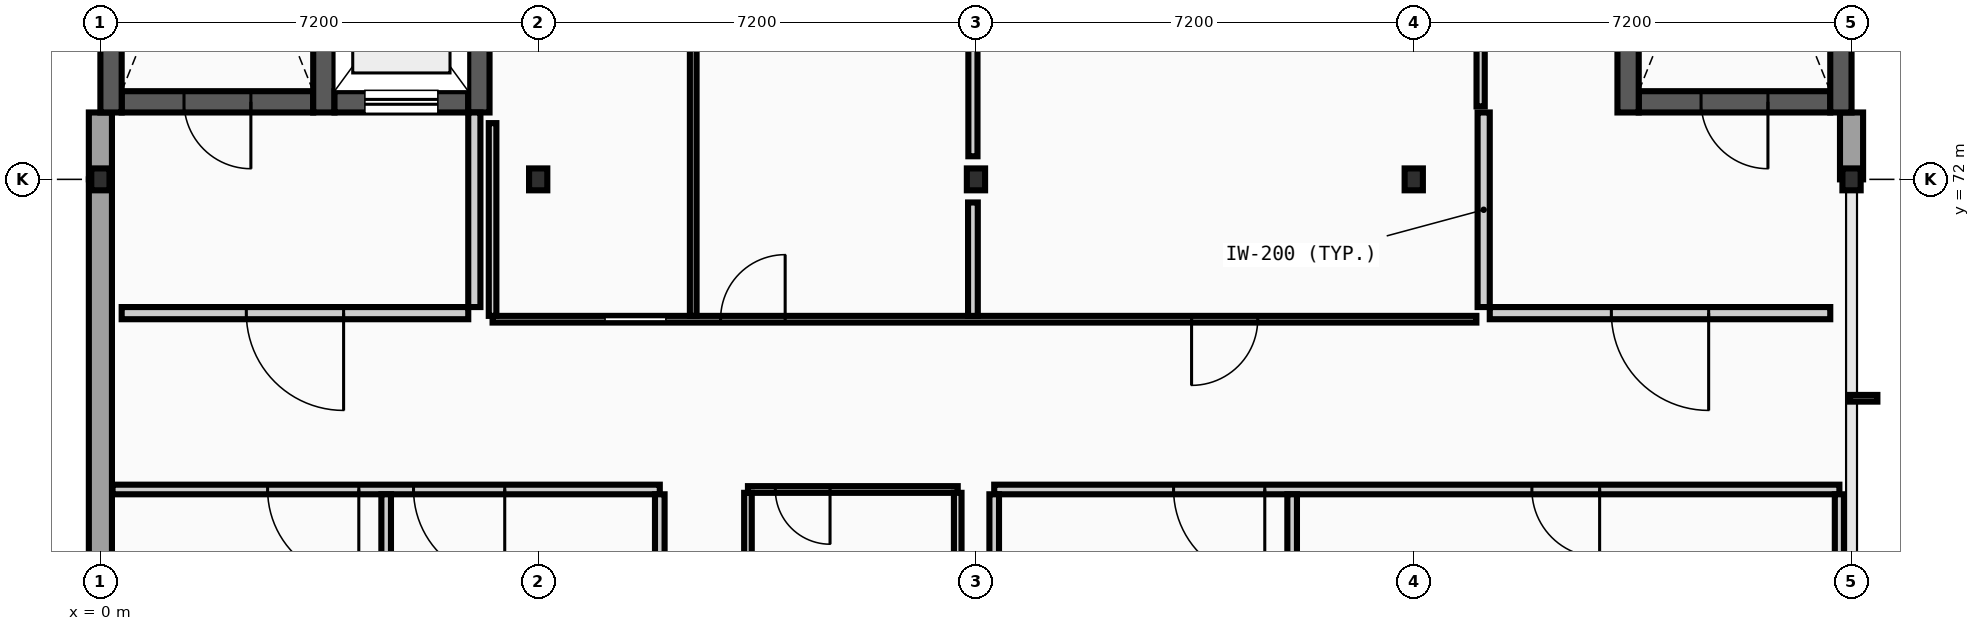
"""IFC4 building model, lengths in metres.
Left out: names, types, materials, properties, quantities, classifications, styles, units other than length and angle.
Written with IfcOpenShell. Run it as: python <this file> out.ifc"""

import sys

from ifc_helpers import new_model, si_unit, direction, frame, frame_2d, origin, origin_2d, place, context, subcontext, project, spatial, rectangle, i_section, extrude, element, fill, save


model = new_model("IFC4")
c1 = context("Model", 3, precision=1e-05, world=origin(), true_north=direction((0.0, 1.0)))
c2 = subcontext(c1, "Body", "Model", "MODEL_VIEW")
j1 = project(units=[si_unit("LENGTHUNIT", "METRE"), si_unit("PLANEANGLEUNIT", "RADIAN")], contexts=[c1])
p1 = place(None, origin())
s1 = spatial("IfcSite", under=j1, at=p1, CompositionType="ELEMENT")
p2 = place(p1, origin())
s2 = spatial("IfcBuilding", under=s1, at=p2, CompositionType="ELEMENT")
p3 = place(p2, frame((0.0, 0.0, 5.2)))
s3 = spatial("IfcBuildingStorey", under=s2, at=p3, CompositionType="ELEMENT", Elevation=5.2)
for number, where, z_axis, x_axis in (
    (1, (0.0, 72.0, 0.0), (0.0, 0.0, 1.0), (1.0, 0.0, 0.0)),
    (2, (7.2, 72.0, 0.0), (0.0, 0.0, 1.0), (1.0, 0.0, 0.0)),
    (3, (14.4, 72.0, 0.0), (0.0, 0.0, 1.0), (1.0, 0.0, 0.0)),
    (4, (21.6, 72.0, 0.0), (0.0, 0.0, 1.0), (1.0, 0.0, 0.0)),
    (5, (28.8, 72.0, 0.0), (0.0, 0.0, 1.0), (1.0, 0.0, 0.0)),
):
    element("IfcColumn", number, at=place(p3, frame(where, z_axis=z_axis, x_axis=x_axis)), inside=s3, PredefinedType="COLUMN", context=c2, shape_type="SweptSolid", body=[
        extrude(i_section(OverallWidth=0.3, OverallDepth=0.36, WebThickness=0.012, FlangeThickness=0.022, FilletRadius=0.027, at=origin_2d()), origin(), (0.0, 0.0, 1.0), 4.4),
    ])
p4 = place(p3, frame((0.0, 72.0, 0.0), z_axis=(0.0, 0.0, 1.0), x_axis=(0.0, -1.0, 0.0)))
e6 = element("IfcWall", 6, at=p4, inside=s3, PredefinedType="STANDARD", context=c2, shape_type="SweptSolid", body=[
    extrude(rectangle(XDim=7.2, YDim=0.38, at=frame_2d((3.6, 0.0))), origin(), (0.0, 0.0, 1.0), 3.81),
])
for number, where, z_axis, x_axis in (
    (7, (0.0, 73.1, 0.0), (0.0, 0.0, 1.0), (0.0, -1.0, 0.0)),
    (8, (28.8, 72.0, 0.0), (0.0, 0.0, 1.0), (0.0, 1.0, 0.0)),
):
    element("IfcWall", number, at=place(p3, frame(where, z_axis=z_axis, x_axis=x_axis)), inside=s3, PredefinedType="STANDARD", context=c2, shape_type="SweptSolid", body=[
        extrude(rectangle(XDim=1.1, YDim=0.38, at=frame_2d((0.55, 0.0))), origin(), (0.0, 0.0, 1.0), 4.185),
    ])
p5 = place(p3, frame((0.35, 73.275, 0.0), z_axis=(0.0, 0.0, 1.0), x_axis=(1.0, 0.0, 0.0)))
e9 = element("IfcWall", 9, at=p5, inside=s3, PredefinedType="SHEAR", context=c2, shape_type="SweptSolid", body=[
    extrude(rectangle(XDim=3.15, YDim=0.35, at=frame_2d((1.575, 0.0))), origin(), (0.0, 0.0, 1.0), 4.185),
])
p6 = place(p5, frame((1.025, 0.0, 0.0)))
e10 = element("IfcOpeningElement", 10, at=p6, cuts=e9, PredefinedType="OPENING", context=c2, shape_type="SweptSolid", body=[
    extrude(rectangle(XDim=1.1, YDim=2.15, at=frame_2d((0.55, 1.075))), frame((0.0, 0.185, 0.0), z_axis=(0.0, -1.0, 0.0), x_axis=(1.0, 0.0, 0.0)), (0.0, 0.0, 1.0), 0.37),
])
for number, where, z_axis, x_axis in (
    (11, (0.175, 73.1, 0.0), (0.0, 0.0, 1.0), (0.0, 1.0, 0.0)),
    (12, (3.675, 73.1, 0.0), (0.0, 0.0, 1.0), (0.0, 1.0, 0.0)),
):
    element("IfcWall", number, at=place(p3, frame(where, z_axis=z_axis, x_axis=x_axis)), inside=s3, PredefinedType="SHEAR", context=c2, shape_type="SweptSolid", body=[
        extrude(rectangle(XDim=8.71, YDim=0.35, at=frame_2d((4.355, 0.0))), origin(), (0.0, 0.0, 1.0), 4.185),
    ])
p7 = place(p3, frame((3.85, 73.275, 0.0), z_axis=(0.0, 0.0, 1.0), x_axis=(1.0, 0.0, 0.0)))
e13 = element("IfcWall", 13, at=p7, inside=s3, PredefinedType="SHEAR", context=c2, shape_type="SweptSolid", body=[
    extrude(rectangle(XDim=2.2, YDim=0.35, at=frame_2d((1.1, 0.0))), origin(), (0.0, 0.0, 1.0), 4.185),
])
p8 = place(p7, frame((0.5, 0.0, 0.0)))
e14 = element("IfcOpeningElement", 14, at=p8, cuts=e13, PredefinedType="OPENING", context=c2, shape_type="SweptSolid", body=[
    extrude(rectangle(XDim=1.2, YDim=2.2, at=frame_2d((0.6, 1.1))), frame((0.0, 0.185, 0.0), z_axis=(0.0, -1.0, 0.0), x_axis=(1.0, 0.0, 0.0)), (0.0, 0.0, 1.0), 0.37),
])
p9 = place(p3, frame((6.225, 73.1, 0.0), z_axis=(0.0, 0.0, 1.0), x_axis=(0.0, 1.0, 0.0)))
e15 = element("IfcWall", 15, at=p9, inside=s3, PredefinedType="SHEAR", context=c2, shape_type="SweptSolid", body=[
    extrude(rectangle(XDim=3.7, YDim=0.35, at=frame_2d((1.85, 0.0))), origin(), (0.0, 0.0, 1.0), 4.185),
])
p10 = place(p3, frame((0.35, 69.8, 0.0), z_axis=(0.0, 0.0, 1.0), x_axis=(1.0, 0.0, 0.0)))
e16 = element("IfcWall", 16, at=p10, inside=s3, PredefinedType="PARTITIONING", context=c2, shape_type="SweptSolid", body=[
    extrude(rectangle(XDim=5.7, YDim=0.2, at=frame_2d((2.85, 0.0))), origin(), (0.0, 0.0, 1.0), 4.185),
])
p11 = place(p10, frame((2.05, 0.0, 0.0)))
e17 = element("IfcOpeningElement", 17, at=p11, cuts=e16, PredefinedType="OPENING", context=c2, shape_type="SweptSolid", body=[
    extrude(rectangle(XDim=1.6, YDim=2.2, at=frame_2d((0.8, 1.1))), frame((0.0, 0.11, 0.0), z_axis=(0.0, -1.0, 0.0), x_axis=(1.0, 0.0, 0.0)), (0.0, 0.0, 1.0), 0.22),
])
p12 = place(p3, frame((6.15, 69.9, 0.0), z_axis=(0.0, 0.0, 1.0), x_axis=(0.0, 1.0, 0.0)))
e18 = element("IfcWall", 18, at=p12, inside=s3, PredefinedType="PARTITIONING", context=c2, shape_type="SweptSolid", body=[
    extrude(rectangle(XDim=3.2, YDim=0.2, at=frame_2d((1.6, 0.0))), origin(), (0.0, 0.0, 1.0), 4.185),
])
p13 = place(p3, frame((25.3, 73.275, 0.0), z_axis=(0.0, 0.0, 1.0), x_axis=(1.0, 0.0, 0.0)))
e19 = element("IfcWall", 19, at=p13, inside=s3, PredefinedType="SHEAR", context=c2, shape_type="SweptSolid", body=[
    extrude(rectangle(XDim=3.15, YDim=0.35, at=frame_2d((1.575, 0.0))), origin(), (0.0, 0.0, 1.0), 4.185),
])
p14 = place(p13, frame((1.025, 0.0, 0.0)))
e20 = element("IfcOpeningElement", 20, at=p14, cuts=e19, PredefinedType="OPENING", context=c2, shape_type="SweptSolid", body=[
    extrude(rectangle(XDim=1.1, YDim=2.15, at=frame_2d((0.55, 1.075))), frame((0.0, 0.185, 0.0), z_axis=(0.0, -1.0, 0.0), x_axis=(1.0, 0.0, 0.0)), (0.0, 0.0, 1.0), 0.37),
])
for number, where, z_axis, x_axis in (
    (21, (25.125, 73.1, 0.0), (0.0, 0.0, 1.0), (0.0, 1.0, 0.0)),
    (22, (28.625, 73.1, 0.0), (0.0, 0.0, 1.0), (0.0, 1.0, 0.0)),
):
    element("IfcWall", number, at=place(p3, frame(where, z_axis=z_axis, x_axis=x_axis)), inside=s3, PredefinedType="SHEAR", context=c2, shape_type="SweptSolid", body=[
        extrude(rectangle(XDim=8.71, YDim=0.35, at=frame_2d((4.355, 0.0))), origin(), (0.0, 0.0, 1.0), 4.185),
    ])
p15 = place(p3, frame((22.85, 69.8, 0.0), z_axis=(0.0, 0.0, 1.0), x_axis=(1.0, 0.0, 0.0)))
e23 = element("IfcWall", 23, at=p15, inside=s3, PredefinedType="PARTITIONING", context=c2, shape_type="SweptSolid", body=[
    extrude(rectangle(XDim=5.6, YDim=0.2, at=frame_2d((2.8, 0.0))), origin(), (0.0, 0.0, 1.0), 4.185),
])
p16 = place(p15, frame((2.0, 0.0, 0.0)))
e24 = element("IfcOpeningElement", 24, at=p16, cuts=e23, PredefinedType="OPENING", context=c2, shape_type="SweptSolid", body=[
    extrude(rectangle(XDim=1.6, YDim=2.2, at=frame_2d((0.8, 1.1))), frame((0.0, 0.11, 0.0), z_axis=(0.0, -1.0, 0.0), x_axis=(1.0, 0.0, 0.0)), (0.0, 0.0, 1.0), 0.22),
])
p17 = place(p3, frame((22.75, 69.9, 0.0), z_axis=(0.0, 0.0, 1.0), x_axis=(0.0, 1.0, 0.0)))
e25 = element("IfcWall", 25, at=p17, inside=s3, PredefinedType="PARTITIONING", context=c2, shape_type="SweptSolid", body=[
    extrude(rectangle(XDim=3.2, YDim=0.2, at=frame_2d((1.6, 0.0))), origin(), (0.0, 0.0, 1.0), 4.185),
])
p18 = place(p3, frame((0.2, 66.9, 0.0), z_axis=(0.0, 0.0, 1.0), x_axis=(1.0, 0.0, 0.0)))
e26 = element("IfcWall", 26, at=p18, inside=s3, PredefinedType="PARTITIONING", context=c2, shape_type="SweptSolid", body=[
    extrude(rectangle(XDim=9.0, YDim=0.158, at=frame_2d((4.5, 0.0))), origin(), (0.0, 0.0, 1.0), 4.185),
])
p19 = place(p18, frame((4.95, 0.0, 0.0)))
e27 = element("IfcOpeningElement", 27, at=p19, cuts=e26, PredefinedType="OPENING", context=c2, shape_type="SweptSolid", body=[
    extrude(rectangle(XDim=1.5, YDim=2.2, at=frame_2d((0.75, 1.1))), frame((0.0, 0.089, 0.0), z_axis=(0.0, -1.0, 0.0), x_axis=(1.0, 0.0, 0.0)), (0.0, 0.0, 1.0), 0.178),
])
p20 = place(p18, frame((2.55, 0.0, 0.0)))
e28 = element("IfcOpeningElement", 28, at=p20, cuts=e26, PredefinedType="OPENING", context=c2, shape_type="SweptSolid", body=[
    extrude(rectangle(XDim=1.5, YDim=2.2, at=frame_2d((0.75, 1.1))), frame((0.0, 0.089, 0.0), z_axis=(0.0, -1.0, 0.0), x_axis=(1.0, 0.0, 0.0)), (0.0, 0.0, 1.0), 0.178),
])
p21 = place(p3, frame((10.65, 66.9, 0.0), z_axis=(0.0, 0.0, 1.0), x_axis=(1.0, 0.0, 0.0)))
e29 = element("IfcWall", 29, at=p21, inside=s3, PredefinedType="PARTITIONING", context=c2, shape_type="SweptSolid", body=[
    extrude(rectangle(XDim=3.45, YDim=0.11, at=frame_2d((1.725, 0.0))), origin(), (0.0, 0.0, 1.0), 4.185),
])
p22 = place(p21, frame((0.45, 0.0, 0.0)))
e30 = element("IfcOpeningElement", 30, at=p22, cuts=e29, PredefinedType="OPENING", context=c2, shape_type="SweptSolid", body=[
    extrude(rectangle(XDim=0.9, YDim=2.1, at=frame_2d((0.45, 1.05))), frame((0.0, 0.065, 0.0), z_axis=(0.0, -1.0, 0.0), x_axis=(1.0, 0.0, 0.0)), (0.0, 0.0, 1.0), 0.13),
])
p23 = place(p3, frame((14.7, 66.9, 0.0), z_axis=(0.0, 0.0, 1.0), x_axis=(1.0, 0.0, 0.0)))
e31 = element("IfcWall", 31, at=p23, inside=s3, PredefinedType="PARTITIONING", context=c2, shape_type="SweptSolid", body=[
    extrude(rectangle(XDim=13.9, YDim=0.158, at=frame_2d((6.95, 0.0))), origin(), (0.0, 0.0, 1.0), 4.185),
])
p24 = place(p23, frame((2.95, 0.0, 0.0)))
e32 = element("IfcOpeningElement", 32, at=p24, cuts=e31, PredefinedType="OPENING", context=c2, shape_type="SweptSolid", body=[
    extrude(rectangle(XDim=1.5, YDim=2.2, at=frame_2d((0.75, 1.1))), frame((0.0, 0.089, 0.0), z_axis=(0.0, -1.0, 0.0), x_axis=(1.0, 0.0, 0.0)), (0.0, 0.0, 1.0), 0.178),
])
p25 = place(p23, frame((8.843, 0.0, 0.0)))
e33 = element("IfcOpeningElement", 33, at=p25, cuts=e31, PredefinedType="OPENING", context=c2, shape_type="SweptSolid", body=[
    extrude(rectangle(XDim=1.114, YDim=2.124, at=frame_2d((0.557, 1.062))), frame((0.0, 0.089, 0.0), z_axis=(0.0, -1.0, 0.0), x_axis=(1.0, 0.0, 0.0)), (0.0, 0.0, 1.0), 0.178),
])
p26 = place(p3, frame((6.45, 69.7, 0.0), z_axis=(0.0, 0.0, 1.0), x_axis=(1.0, 0.0, 0.0)))
e34 = element("IfcWall", 34, at=p26, inside=s3, PredefinedType="PARTITIONING", context=c2, shape_type="SweptSolid", body=[
    extrude(rectangle(XDim=16.18, YDim=0.11, at=frame_2d((8.09, 0.0))), origin(), (0.0, 0.0, 1.0), 4.185),
])
p27 = place(p26, frame((1.85, 0.0, 0.0)))
e35 = element("IfcOpeningElement", 35, at=p27, cuts=e34, PredefinedType="OPENING", context=c2, shape_type="SweptSolid", body=[
    extrude(rectangle(XDim=1.0, YDim=2.1, at=frame_2d((0.5, 1.05))), frame((0.0, 0.065, 0.0), z_axis=(0.0, -1.0, 0.0), x_axis=(1.0, 0.0, 0.0)), (0.0, 0.0, 1.0), 0.13),
])
p28 = place(p26, frame((3.75, 0.0, 0.0)))
e36 = element("IfcOpeningElement", 36, at=p28, cuts=e34, PredefinedType="OPENING", context=c2, shape_type="SweptSolid", body=[
    extrude(rectangle(XDim=1.062, YDim=2.124, at=frame_2d((0.531, 1.062))), frame((0.0, 0.065, 0.0), z_axis=(0.0, -1.0, 0.0), x_axis=(1.0, 0.0, 0.0)), (0.0, 0.0, 1.0), 0.13),
])
p29 = place(p26, frame((11.496, 0.0, 0.0)))
e37 = element("IfcOpeningElement", 37, at=p29, cuts=e34, PredefinedType="OPENING", context=c2, shape_type="SweptSolid", body=[
    extrude(rectangle(XDim=1.088, YDim=2.124, at=frame_2d((0.544, 1.062))), frame((0.0, 0.065, 0.0), z_axis=(0.0, -1.0, 0.0), x_axis=(1.0, 0.0, 0.0)), (0.0, 0.0, 1.0), 0.13),
])
p30 = place(p3, frame((4.7, 51.32, 0.0), z_axis=(0.0, 0.0, 1.0), x_axis=(0.0, 1.0, 0.0)))
e38 = element("IfcWall", 38, at=p30, inside=s3, PredefinedType="PARTITIONING", context=c2, shape_type="SweptSolid", body=[
    extrude(rectangle(XDim=15.501, YDim=0.158, at=frame_2d((7.75, 0.0))), origin(), (0.0, 0.0, 1.0), 3.9),
])
p31 = place(p3, frame((6.45, 69.755, 0.0), z_axis=(0.0, 0.0, 1.0), x_axis=(0.0, 1.0, 0.0)))
e39 = element("IfcWall", 39, at=p31, inside=s3, PredefinedType="PARTITIONING", context=c2, shape_type="SweptSolid", body=[
    extrude(rectangle(XDim=3.17, YDim=0.125, at=frame_2d((1.585, 0.0))), origin(), (0.0, 0.0, 1.0), 4.185),
])
p32 = place(p3, frame((9.2, 60.96, 0.0), z_axis=(0.0, 0.0, 1.0), x_axis=(0.0, 1.0, 0.0)))
e40 = element("IfcWall", 40, at=p32, inside=s3, PredefinedType="PARTITIONING", context=c2, shape_type="SweptSolid", body=[
    extrude(rectangle(XDim=5.861, YDim=0.158, at=frame_2d((2.931, 0.0))), origin(), (0.0, 0.0, 1.0), 4.185),
])
p33 = place(p3, frame((9.75, 69.755, 0.0), z_axis=(0.0, 0.0, 1.0), x_axis=(0.0, 1.0, 0.0)))
e41 = element("IfcWall", 41, at=p33, inside=s3, PredefinedType="PARTITIONING", context=c2, shape_type="SweptSolid", body=[
    extrude(rectangle(XDim=12.045, YDim=0.11, at=frame_2d((6.022, 0.0))), origin(), (0.0, 0.0, 1.0), 3.9),
])
p34 = place(p3, frame((10.65, 60.96, 0.0), z_axis=(0.0, 0.0, 1.0), x_axis=(0.0, 1.0, 0.0)))
e42 = element("IfcWall", 42, at=p34, inside=s3, PredefinedType="PARTITIONING", context=c2, shape_type="SweptSolid", body=[
    extrude(rectangle(XDim=5.885, YDim=0.125, at=frame_2d((2.942, 0.0))), origin(), (0.0, 0.0, 1.0), 4.185),
])
p35 = place(p3, frame((14.1, 65.18, 0.0), z_axis=(0.0, 0.0, 1.0), x_axis=(0.0, 1.0, 0.0)))
e43 = element("IfcWall", 43, at=p35, inside=s3, PredefinedType="PARTITIONING", context=c2, shape_type="SweptSolid", body=[
    extrude(rectangle(XDim=1.665, YDim=0.125, at=frame_2d((0.833, 0.0))), origin(), (0.0, 0.0, 1.0), 4.185),
])
p36 = place(p3, frame((14.35, 69.755, 0.0), z_axis=(0.0, 0.0, 1.0), x_axis=(0.0, 1.0, 0.0)))
e44 = element("IfcWall", 44, at=p36, inside=s3, PredefinedType="PARTITIONING", context=c2, shape_type="SweptSolid", body=[
    extrude(rectangle(XDim=1.865, YDim=0.16, at=frame_2d((0.933, 0.0))), origin(), (0.0, 0.0, 1.0), 3.88),
])
p37 = place(p3, frame((14.35, 72.38, 0.0), z_axis=(0.0, 0.0, 1.0), x_axis=(0.0, 1.0, 0.0)))
e45 = element("IfcWall", 45, at=p37, inside=s3, PredefinedType="PARTITIONING", context=c2, shape_type="SweptSolid", body=[
    extrude(rectangle(XDim=6.44, YDim=0.15, at=frame_2d((3.22, 0.0))), origin(), (0.0, 0.0, 1.0), 3.88),
])
p38 = place(p3, frame((14.7, 65.18, 0.0), z_axis=(0.0, 0.0, 1.0), x_axis=(0.0, 1.0, 0.0)))
e46 = element("IfcWall", 46, at=p38, inside=s3, PredefinedType="PARTITIONING", context=c2, shape_type="SweptSolid", body=[
    extrude(rectangle(XDim=1.641, YDim=0.158, at=frame_2d((0.821, 0.0))), origin(), (0.0, 0.0, 1.0), 3.88),
])
p39 = place(p3, frame((19.6, 51.32, 0.0), z_axis=(0.0, 0.0, 1.0), x_axis=(0.0, 1.0, 0.0)))
e47 = element("IfcWall", 47, at=p39, inside=s3, PredefinedType="PARTITIONING", context=c2, shape_type="SweptSolid", body=[
    extrude(rectangle(XDim=15.501, YDim=0.158, at=frame_2d((7.75, 0.0))), origin(), (0.0, 0.0, 1.0), 4.185),
])
p40 = place(p3, frame((22.7, 73.2, 0.0), z_axis=(0.0, 0.0, 1.0), x_axis=(0.0, 1.0, 0.0)))
e48 = element("IfcWall", 48, at=p40, inside=s3, PredefinedType="PARTITIONING", context=c2, shape_type="SweptSolid", body=[
    extrude(rectangle(XDim=8.6, YDim=0.135, at=frame_2d((4.3, 0.0))), origin(), (0.0, 0.0, 1.0), 4.185),
])
p41 = place(p3, frame((28.6, 65.18, 0.0), z_axis=(0.0, 0.0, 1.0), x_axis=(0.0, 1.0, 0.0)))
e49 = element("IfcWall", 49, at=p41, inside=s3, PredefinedType="PARTITIONING", context=c2, shape_type="SweptSolid", body=[
    extrude(rectangle(XDim=1.641, YDim=0.15, at=frame_2d((0.821, 0.0))), origin(), (0.0, 0.0, 1.0), 3.81),
])
p42 = place(p6, origin())
e50 = element("IfcDoor", 50, at=p42, inside=s3, OperationType="SINGLE_SWING_RIGHT", PredefinedType="DOOR", context=c2, shape_type="SweptSolid", body=[
    extrude(rectangle(XDim=1.1, YDim=2.15, at=frame_2d((0.55, 1.075))), frame((0.0, 0.025, 0.0), z_axis=(0.0, -1.0, 0.0), x_axis=(1.0, 0.0, 0.0)), (0.0, 0.0, 1.0), 0.05),
])
fill(e10, e50)
p43 = place(p8, origin())
e51 = element("IfcDoor", 51, at=p43, inside=s3, OperationType="SLIDING_TO_RIGHT", PredefinedType="DOOR", context=c2, shape_type="SweptSolid", body=[
    extrude(rectangle(XDim=1.2, YDim=2.2, at=frame_2d((0.6, 1.1))), frame((0.0, 0.025, 0.0), z_axis=(0.0, -1.0, 0.0), x_axis=(1.0, 0.0, 0.0)), (0.0, 0.0, 1.0), 0.05),
])
fill(e14, e51)
p44 = place(p11, origin())
e52 = element("IfcDoor", 52, at=p44, inside=s3, OperationType="DOUBLE_DOOR_SINGLE_SWING", PredefinedType="DOOR", context=c2, shape_type="SweptSolid", body=[
    extrude(rectangle(XDim=1.6, YDim=2.2, at=frame_2d((0.8, 1.1))), frame((0.0, 0.025, 0.0), z_axis=(0.0, -1.0, 0.0), x_axis=(1.0, 0.0, 0.0)), (0.0, 0.0, 1.0), 0.05),
])
fill(e17, e52)
p45 = place(p14, origin())
e53 = element("IfcDoor", 53, at=p45, inside=s3, OperationType="SINGLE_SWING_RIGHT", PredefinedType="DOOR", context=c2, shape_type="SweptSolid", body=[
    extrude(rectangle(XDim=1.1, YDim=2.15, at=frame_2d((0.55, 1.075))), frame((0.0, 0.025, 0.0), z_axis=(0.0, -1.0, 0.0), x_axis=(1.0, 0.0, 0.0)), (0.0, 0.0, 1.0), 0.05),
])
fill(e20, e53)
p46 = place(p16, origin())
e54 = element("IfcDoor", 54, at=p46, inside=s3, OperationType="DOUBLE_DOOR_SINGLE_SWING", PredefinedType="DOOR", context=c2, shape_type="SweptSolid", body=[
    extrude(rectangle(XDim=1.6, YDim=2.2, at=frame_2d((0.8, 1.1))), frame((0.0, 0.025, 0.0), z_axis=(0.0, -1.0, 0.0), x_axis=(1.0, 0.0, 0.0)), (0.0, 0.0, 1.0), 0.05),
])
fill(e24, e54)
p47 = place(p27, frame((1.0, 0.0, 0.0), z_axis=(0.0, 0.0, 1.0), x_axis=(-1.0, 0.0, 0.0)))
e55 = element("IfcDoor", 55, at=p47, inside=s3, OperationType="SLIDING_TO_LEFT", PredefinedType="DOOR", context=c2, shape_type="SweptSolid", body=[
    extrude(rectangle(XDim=1.0, YDim=2.1, at=frame_2d((0.5, 1.05))), frame((0.0, 0.025, 0.0), z_axis=(0.0, -1.0, 0.0), x_axis=(1.0, 0.0, 0.0)), (0.0, 0.0, 1.0), 0.05),
])
fill(e35, e55)
p48 = place(p22, origin())
e56 = element("IfcDoor", 56, at=p48, inside=s3, OperationType="SINGLE_SWING_RIGHT", PredefinedType="DOOR", context=c2, shape_type="SweptSolid", body=[
    extrude(rectangle(XDim=0.9, YDim=2.1, at=frame_2d((0.45, 1.05))), frame((0.0, 0.025, 0.0), z_axis=(0.0, -1.0, 0.0), x_axis=(1.0, 0.0, 0.0)), (0.0, 0.0, 1.0), 0.05),
])
fill(e30, e56)
p49 = place(p28, frame((1.062, 0.0, 0.0), z_axis=(0.0, 0.0, 1.0), x_axis=(-1.0, 0.0, 0.0)))
e57 = element("IfcDoor", 57, at=p49, inside=s3, OperationType="SINGLE_SWING_RIGHT", PredefinedType="DOOR", context=c2, shape_type="SweptSolid", body=[
    extrude(rectangle(XDim=1.062, YDim=2.124, at=frame_2d((0.531, 1.062))), frame((0.0, 0.025, 0.0), z_axis=(0.0, -1.0, 0.0), x_axis=(1.0, 0.0, 0.0)), (0.0, 0.0, 1.0), 0.05),
])
fill(e36, e57)
p50 = place(p19, origin())
e58 = element("IfcDoor", 58, at=p50, inside=s3, OperationType="DOUBLE_DOOR_SINGLE_SWING", PredefinedType="DOOR", context=c2, shape_type="SweptSolid", body=[
    extrude(rectangle(XDim=1.5, YDim=2.2, at=frame_2d((0.75, 1.1))), frame((0.0, 0.025, 0.0), z_axis=(0.0, -1.0, 0.0), x_axis=(1.0, 0.0, 0.0)), (0.0, 0.0, 1.0), 0.05),
])
fill(e27, e58)
p51 = place(p20, origin())
e59 = element("IfcDoor", 59, at=p51, inside=s3, OperationType="DOUBLE_DOOR_SINGLE_SWING", PredefinedType="DOOR", context=c2, shape_type="SweptSolid", body=[
    extrude(rectangle(XDim=1.5, YDim=2.2, at=frame_2d((0.75, 1.1))), frame((0.0, 0.025, 0.0), z_axis=(0.0, -1.0, 0.0), x_axis=(1.0, 0.0, 0.0)), (0.0, 0.0, 1.0), 0.05),
])
fill(e28, e59)
p52 = place(p24, origin())
e60 = element("IfcDoor", 60, at=p52, inside=s3, OperationType="DOUBLE_DOOR_SINGLE_SWING", PredefinedType="DOOR", context=c2, shape_type="SweptSolid", body=[
    extrude(rectangle(XDim=1.5, YDim=2.2, at=frame_2d((0.75, 1.1))), frame((0.0, 0.025, 0.0), z_axis=(0.0, -1.0, 0.0), x_axis=(1.0, 0.0, 0.0)), (0.0, 0.0, 1.0), 0.05),
])
fill(e32, e60)
p53 = place(p29, frame((1.088, 0.0, 0.0), z_axis=(0.0, 0.0, 1.0), x_axis=(-1.0, 0.0, 0.0)))
e61 = element("IfcDoor", 61, at=p53, inside=s3, OperationType="SINGLE_SWING_LEFT", PredefinedType="DOOR", context=c2, shape_type="SweptSolid", body=[
    extrude(rectangle(XDim=1.088, YDim=2.124, at=frame_2d((0.544, 1.062))), frame((0.0, 0.025, 0.0), z_axis=(0.0, -1.0, 0.0), x_axis=(1.0, 0.0, 0.0)), (0.0, 0.0, 1.0), 0.05),
])
fill(e37, e61)
p54 = place(p25, origin())
e62 = element("IfcDoor", 62, at=p54, inside=s3, OperationType="SINGLE_SWING_RIGHT", PredefinedType="DOOR", context=c2, shape_type="SweptSolid", body=[
    extrude(rectangle(XDim=1.114, YDim=2.124, at=frame_2d((0.557, 1.062))), frame((0.0, 0.025, 0.0), z_axis=(0.0, -1.0, 0.0), x_axis=(1.0, 0.0, 0.0)), (0.0, 0.0, 1.0), 0.05),
])
fill(e33, e62)
save(model, sys.argv[1])
